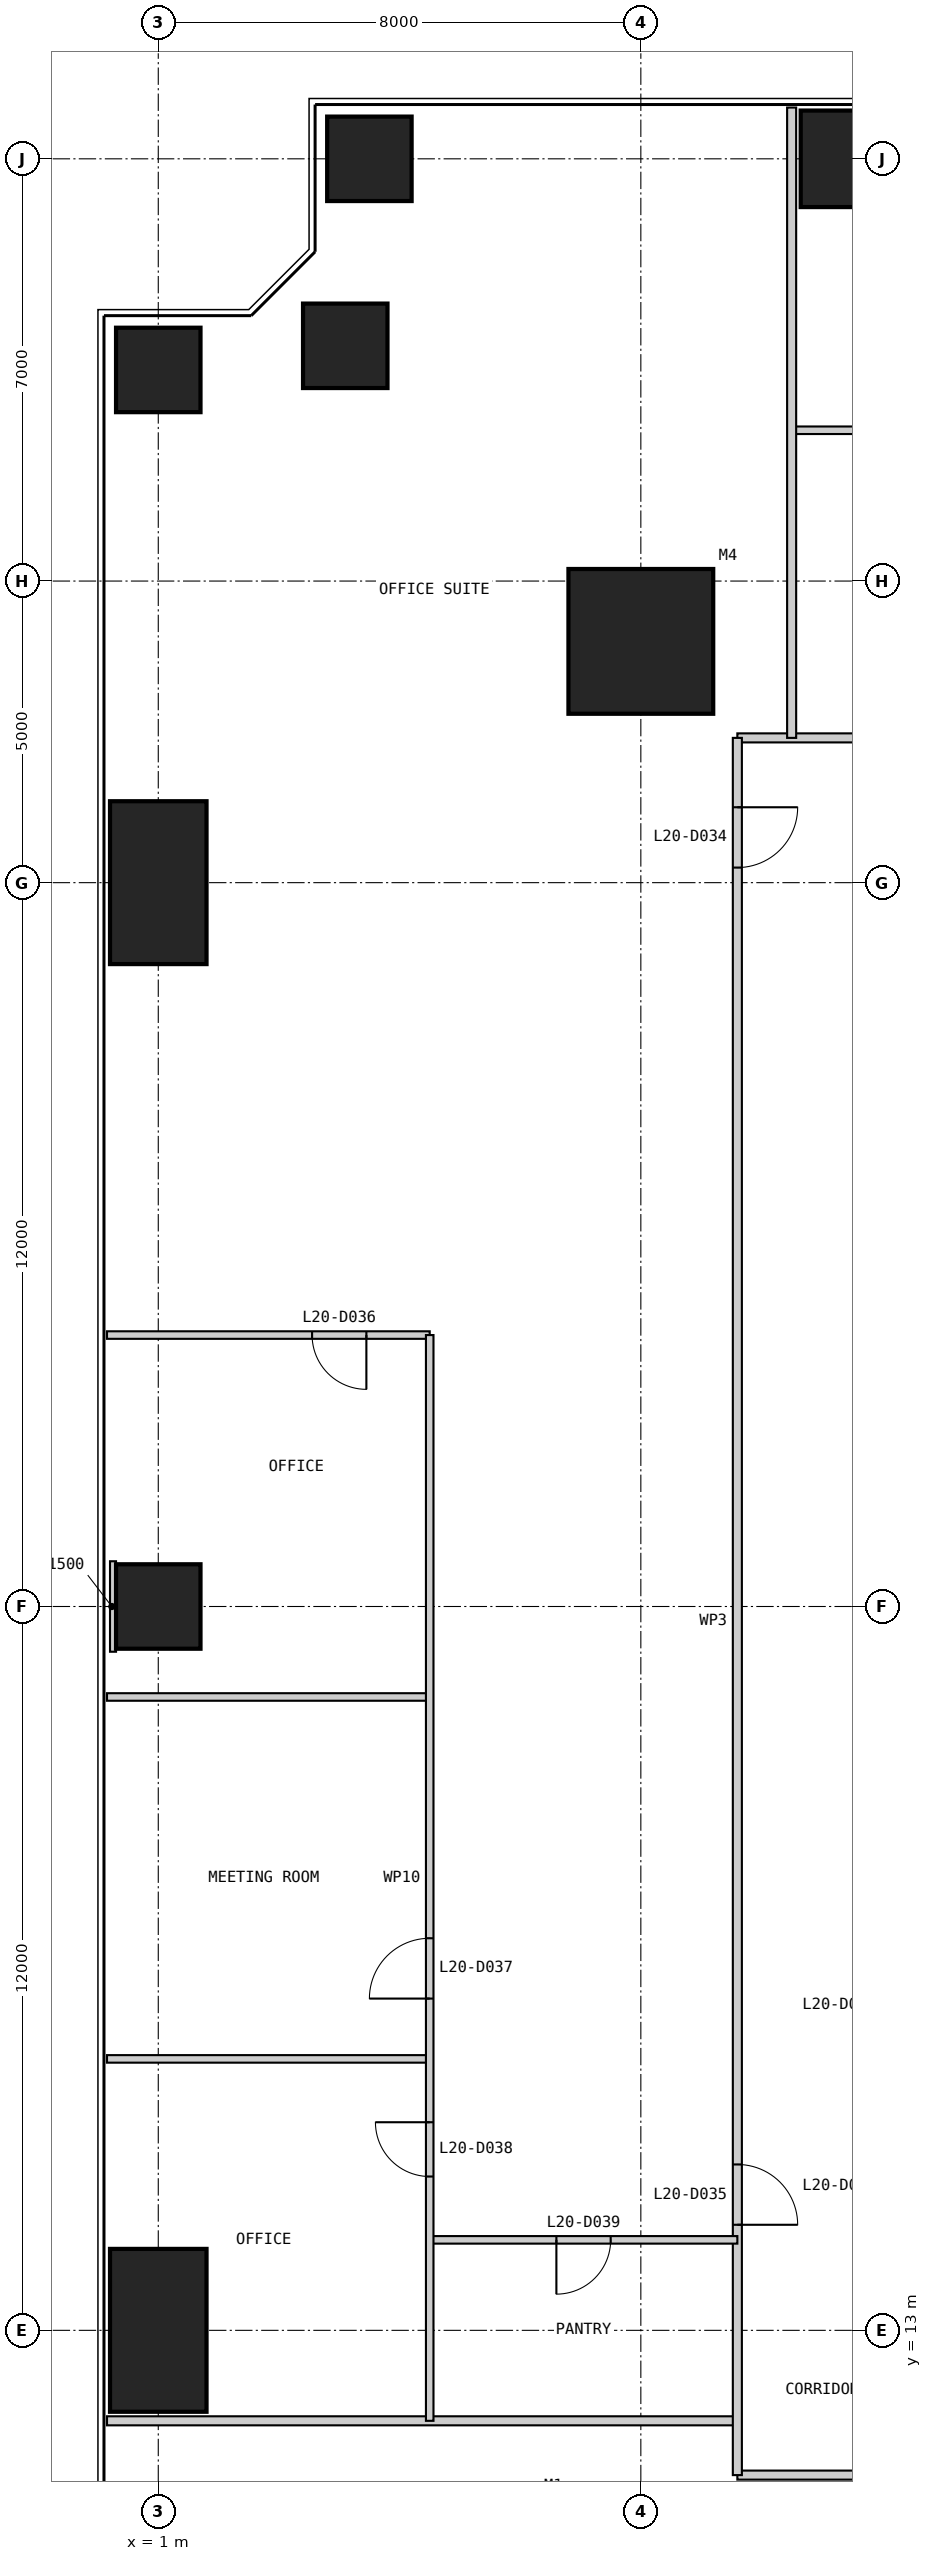
"""IFC4 building model, lengths in metres.
Left out: names, types, materials, properties, quantities, classifications, styles, units other than length and angle.
Written with IfcOpenShell. Run it as: python <this file> out.ifc"""

import sys

from ifc_helpers import new_model, si_unit, direction, frame, frame_2d, origin, origin_2d, place, context, subcontext, project, spatial, rectangle, extrude, element, fill, save


model = new_model("IFC4")
c1 = context("Model", 3, precision=1e-05, world=origin(), true_north=direction((0.0, 1.0)))
c2 = subcontext(c1, "Body", "Model", "MODEL_VIEW")
j1 = project(units=[si_unit("LENGTHUNIT", "METRE"), si_unit("PLANEANGLEUNIT", "RADIAN")], contexts=[c1])
p1 = place(None, origin())
s1 = spatial("IfcSite", under=j1, at=p1, CompositionType="ELEMENT")
p2 = place(p1, origin())
s2 = spatial("IfcBuilding", under=s1, at=p2, CompositionType="ELEMENT")
p3 = place(p2, frame((0.0, 0.0, 87.0)))
s3 = spatial("IfcBuildingStorey", under=s2, at=p3, CompositionType="ELEMENT", Elevation=87.0)
p4 = place(p3, frame((9.0, 41.0, 0.0), z_axis=(0.0, 0.0, 1.0), x_axis=(1.0, 0.0, 0.0)))
e1 = element("IfcColumn", 1, at=p4, inside=s3, PredefinedType="COLUMN", context=c2, shape_type="SweptSolid", body=[
    extrude(rectangle(XDim=2.4, YDim=2.4, at=origin_2d()), origin(), (0.0, 0.0, 1.0), 4.0),
])
p5 = place(p3, frame((13.0, 49.0, 0.0), z_axis=(0.0, 0.0, 1.0), x_axis=(1.0, 0.0, 0.0)))
e2 = element("IfcColumn", 2, at=p5, inside=s3, PredefinedType="COLUMN", context=c2, shape_type="SweptSolid", body=[
    extrude(rectangle(XDim=2.7, YDim=1.6, at=origin_2d()), origin(), (0.0, 0.0, 1.0), 4.0),
])
for number, where, z_axis, x_axis in (
    (3, (4.5, 49.0, 0.0), (0.0, 0.0, 1.0), (1.0, 0.0, 0.0)),
    (4, (4.1, 45.9, 0.0), (0.0, 0.0, 1.0), (1.0, 0.0, 0.0)),
    (5, (1.0, 45.5, 0.0), (0.0, 0.0, 1.0), (1.0, 0.0, 0.0)),
):
    element("IfcColumn", number, at=place(p3, frame(where, z_axis=z_axis, x_axis=x_axis)), inside=s3, PredefinedType="COLUMN", context=c2, shape_type="SweptSolid", body=[
        extrude(rectangle(XDim=1.4, YDim=1.4, at=origin_2d()), origin(), (0.0, 0.0, 1.0), 4.0),
    ])
p6 = place(p3, frame((1.0, 37.0, 0.0), z_axis=(0.0, 0.0, 1.0), x_axis=(1.0, 0.0, 0.0)))
e6 = element("IfcColumn", 6, at=p6, inside=s3, PredefinedType="COLUMN", context=c2, shape_type="SweptSolid", body=[
    extrude(rectangle(XDim=1.6, YDim=2.7, at=origin_2d()), origin(), (0.0, 0.0, 1.0), 4.0),
])
p7 = place(p3, frame((1.0, 25.0, 0.0), z_axis=(0.0, 0.0, 1.0), x_axis=(1.0, 0.0, 0.0)))
e7 = element("IfcColumn", 7, at=p7, inside=s3, PredefinedType="COLUMN", context=c2, shape_type="SweptSolid", body=[
    extrude(rectangle(XDim=1.4, YDim=1.4, at=origin_2d()), origin(), (0.0, 0.0, 1.0), 4.0),
])
p8 = place(p3, frame((1.0, 13.0, 0.0), z_axis=(0.0, 0.0, 1.0), x_axis=(1.0, 0.0, 0.0)))
e8 = element("IfcColumn", 8, at=p8, inside=s3, PredefinedType="COLUMN", context=c2, shape_type="SweptSolid", body=[
    extrude(rectangle(XDim=1.6, YDim=2.7, at=origin_2d()), origin(), (0.0, 0.0, 1.0), 4.0),
])
p9 = place(p3, frame((10.6, 10.6, 0.0), z_axis=(0.0, 0.0, 1.0), x_axis=(1.0, 0.0, 0.0)))
e9 = element("IfcWall", 9, at=p9, inside=s3, PredefinedType="PARTITIONING", context=c2, shape_type="SweptSolid", body=[
    extrude(rectangle(XDim=27.9, YDim=0.15, at=frame_2d((13.95, 0.0))), origin(), (0.0, 0.0, 1.0), 3.8),
])
p10 = place(p9, frame((3.4, 0.0, 0.0)))
e10 = element("IfcOpeningElement", 10, at=p10, cuts=e9, PredefinedType="OPENING", context=c2, shape_type="SweptSolid", body=[
    extrude(rectangle(XDim=1.0, YDim=2.2, at=frame_2d((0.5, 1.1))), frame((0.0, 0.085, 0.0), z_axis=(0.0, -1.0, 0.0), x_axis=(1.0, 0.0, 0.0)), (0.0, 0.0, 1.0), 0.17),
])
p11 = place(p9, frame((10.15, 0.0, 0.0)))
e11 = element("IfcOpeningElement", 11, at=p11, cuts=e9, PredefinedType="OPENING", context=c2, shape_type="SweptSolid", body=[
    extrude(rectangle(XDim=1.0, YDim=2.2, at=frame_2d((0.5, 1.1))), frame((0.0, 0.085, 0.0), z_axis=(0.0, -1.0, 0.0), x_axis=(1.0, 0.0, 0.0)), (0.0, 0.0, 1.0), 0.17),
])
p12 = place(p9, frame((17.65, 0.0, 0.0)))
e12 = element("IfcOpeningElement", 12, at=p12, cuts=e9, PredefinedType="OPENING", context=c2, shape_type="SweptSolid", body=[
    extrude(rectangle(XDim=1.0, YDim=2.2, at=frame_2d((0.5, 1.1))), frame((0.0, 0.085, 0.0), z_axis=(0.0, -1.0, 0.0), x_axis=(1.0, 0.0, 0.0)), (0.0, 0.0, 1.0), 0.17),
])
p13 = place(p9, frame((24.4, 0.0, 0.0)))
e13 = element("IfcOpeningElement", 13, at=p13, cuts=e9, PredefinedType="OPENING", context=c2, shape_type="SweptSolid", body=[
    extrude(rectangle(XDim=1.0, YDim=2.2, at=frame_2d((0.5, 1.1))), frame((0.0, 0.085, 0.0), z_axis=(0.0, -1.0, 0.0), x_axis=(1.0, 0.0, 0.0)), (0.0, 0.0, 1.0), 0.17),
])
p14 = place(p3, frame((0.15, 11.5, 0.0), z_axis=(0.0, 0.0, 1.0), x_axis=(1.0, 0.0, 0.0)))
e14 = element("IfcWall", 14, at=p14, inside=s3, PredefinedType="PARTITIONING", context=c2, shape_type="SweptSolid", body=[
    extrude(rectangle(XDim=10.45, YDim=0.15, at=frame_2d((5.225, 0.0))), origin(), (0.0, 0.0, 1.0), 3.8),
])
p15 = place(p3, frame((38.5, 39.4, 0.0), z_axis=(0.0, 0.0, 1.0), x_axis=(-1.0, 0.0, 0.0)))
e15 = element("IfcWall", 15, at=p15, inside=s3, PredefinedType="PARTITIONING", context=c2, shape_type="SweptSolid", body=[
    extrude(rectangle(XDim=27.9, YDim=0.15, at=frame_2d((13.95, 0.0))), origin(), (0.0, 0.0, 1.0), 3.8),
])
p16 = place(p15, frame((0.25, 0.0, 0.0)))
e16 = element("IfcOpeningElement", 16, at=p16, cuts=e15, PredefinedType="OPENING", context=c2, shape_type="SweptSolid", body=[
    extrude(rectangle(XDim=1.0, YDim=2.2, at=frame_2d((0.5, 1.1))), frame((0.0, 0.085, 0.0), z_axis=(0.0, -1.0, 0.0), x_axis=(1.0, 0.0, 0.0)), (0.0, 0.0, 1.0), 0.17),
])
p17 = place(p15, frame((22.75, 0.0, 0.0)))
e17 = element("IfcOpeningElement", 17, at=p17, cuts=e15, PredefinedType="OPENING", context=c2, shape_type="SweptSolid", body=[
    extrude(rectangle(XDim=1.0, YDim=2.2, at=frame_2d((0.5, 1.1))), frame((0.0, 0.085, 0.0), z_axis=(0.0, -1.0, 0.0), x_axis=(1.0, 0.0, 0.0)), (0.0, 0.0, 1.0), 0.17),
])
p18 = place(p3, frame((29.5, 44.5, 0.0), z_axis=(0.0, 0.0, 1.0), x_axis=(-1.0, 0.0, 0.0)))
e18 = element("IfcWall", 18, at=p18, inside=s3, PredefinedType="PARTITIONING", context=c2, shape_type="SweptSolid", body=[
    extrude(rectangle(XDim=18.0, YDim=0.125, at=frame_2d((9.0, 0.0))), origin(), (0.0, 0.0, 1.0), 3.8),
])
p19 = place(p18, frame((10.0, 0.0, 0.0)))
e19 = element("IfcOpeningElement", 19, at=p19, cuts=e18, PredefinedType="OPENING", context=c2, shape_type="SweptSolid", body=[
    extrude(rectangle(XDim=1.0, YDim=2.2, at=frame_2d((0.5, 1.1))), frame((0.0, 0.073, 0.0), z_axis=(0.0, -1.0, 0.0), x_axis=(1.0, 0.0, 0.0)), (0.0, 0.0, 1.0), 0.145),
])
p20 = place(p18, frame((13.05, 0.0, 0.0)))
e20 = element("IfcOpeningElement", 20, at=p20, cuts=e18, PredefinedType="OPENING", context=c2, shape_type="SweptSolid", body=[
    extrude(rectangle(XDim=0.9, YDim=2.2, at=frame_2d((0.45, 1.1))), frame((0.0, 0.073, 0.0), z_axis=(0.0, -1.0, 0.0), x_axis=(1.0, 0.0, 0.0)), (0.0, 0.0, 1.0), 0.145),
])
p21 = place(p3, frame((10.6, 39.4, 0.0), z_axis=(0.0, 0.0, 1.0), x_axis=(0.0, -1.0, 0.0)))
e21 = element("IfcWall", 21, at=p21, inside=s3, PredefinedType="PARTITIONING", context=c2, shape_type="SweptSolid", body=[
    extrude(rectangle(XDim=28.8, YDim=0.15, at=frame_2d((14.4, 0.0))), origin(), (0.0, 0.0, 1.0), 3.8),
])
p22 = place(p21, frame((1.15, 0.0, 0.0)))
e22 = element("IfcOpeningElement", 22, at=p22, cuts=e21, PredefinedType="OPENING", context=c2, shape_type="SweptSolid", body=[
    extrude(rectangle(XDim=1.0, YDim=2.2, at=frame_2d((0.5, 1.1))), frame((0.0, 0.085, 0.0), z_axis=(0.0, -1.0, 0.0), x_axis=(1.0, 0.0, 0.0)), (0.0, 0.0, 1.0), 0.17),
])
p23 = place(p21, frame((23.65, 0.0, 0.0)))
e23 = element("IfcOpeningElement", 23, at=p23, cuts=e21, PredefinedType="OPENING", context=c2, shape_type="SweptSolid", body=[
    extrude(rectangle(XDim=1.0, YDim=2.2, at=frame_2d((0.5, 1.1))), frame((0.0, 0.085, 0.0), z_axis=(0.0, -1.0, 0.0), x_axis=(1.0, 0.0, 0.0)), (0.0, 0.0, 1.0), 0.17),
])
p24 = place(p3, frame((11.5, 49.85, 0.0), z_axis=(0.0, 0.0, 1.0), x_axis=(0.0, -1.0, 0.0)))
e24 = element("IfcWall", 24, at=p24, inside=s3, PredefinedType="PARTITIONING", context=c2, shape_type="SweptSolid", body=[
    extrude(rectangle(XDim=10.45, YDim=0.15, at=frame_2d((5.225, 0.0))), origin(), (0.0, 0.0, 1.0), 3.8),
])
p25 = place(p3, frame((0.15, 29.5, 0.0), z_axis=(0.0, 0.0, 1.0), x_axis=(1.0, 0.0, 0.0)))
e25 = element("IfcWall", 25, at=p25, inside=s3, PredefinedType="PARTITIONING", context=c2, shape_type="SweptSolid", body=[
    extrude(rectangle(XDim=5.35, YDim=0.125, at=frame_2d((2.675, 0.0))), origin(), (0.0, 0.0, 1.0), 3.8),
])
p26 = place(p25, frame((3.4, 0.0, 0.0)))
e26 = element("IfcOpeningElement", 26, at=p26, cuts=e25, PredefinedType="OPENING", context=c2, shape_type="SweptSolid", body=[
    extrude(rectangle(XDim=0.9, YDim=2.2, at=frame_2d((0.45, 1.1))), frame((0.0, 0.073, 0.0), z_axis=(0.0, -1.0, 0.0), x_axis=(1.0, 0.0, 0.0)), (0.0, 0.0, 1.0), 0.145),
])
for number, where, z_axis, x_axis in (
    (27, (0.15, 23.5, 0.0), (0.0, 0.0, 1.0), (1.0, 0.0, 0.0)),
    (28, (0.15, 17.5, 0.0), (0.0, 0.0, 1.0), (1.0, 0.0, 0.0)),
):
    element("IfcWall", number, at=place(p3, frame(where, z_axis=z_axis, x_axis=x_axis)), inside=s3, PredefinedType="PARTITIONING", context=c2, shape_type="SweptSolid", body=[
        extrude(rectangle(XDim=5.35, YDim=0.125, at=frame_2d((2.675, 0.0))), origin(), (0.0, 0.0, 1.0), 3.8),
    ])
p27 = place(p3, frame((5.5, 14.5, 0.0), z_axis=(0.0, 0.0, 1.0), x_axis=(1.0, 0.0, 0.0)))
e29 = element("IfcWall", 29, at=p27, inside=s3, PredefinedType="PARTITIONING", context=c2, shape_type="SweptSolid", body=[
    extrude(rectangle(XDim=5.1, YDim=0.125, at=frame_2d((2.55, 0.0))), origin(), (0.0, 0.0, 1.0), 3.8),
])
p28 = place(p27, frame((2.1, 0.0, 0.0)))
e30 = element("IfcOpeningElement", 30, at=p28, cuts=e29, PredefinedType="OPENING", context=c2, shape_type="SweptSolid", body=[
    extrude(rectangle(XDim=0.9, YDim=2.2, at=frame_2d((0.45, 1.1))), frame((0.0, 0.073, 0.0), z_axis=(0.0, -1.0, 0.0), x_axis=(1.0, 0.0, 0.0)), (0.0, 0.0, 1.0), 0.145),
])
p29 = place(p3, frame((5.5, 29.5, 0.0), z_axis=(0.0, 0.0, 1.0), x_axis=(0.0, -1.0, 0.0)))
e31 = element("IfcWall", 31, at=p29, inside=s3, PredefinedType="PARTITIONING", context=c2, shape_type="SweptSolid", body=[
    extrude(rectangle(XDim=18.0, YDim=0.125, at=frame_2d((9.0, 0.0))), origin(), (0.0, 0.0, 1.0), 3.8),
])
p30 = place(p29, frame((10.0, 0.0, 0.0)))
e32 = element("IfcOpeningElement", 32, at=p30, cuts=e31, PredefinedType="OPENING", context=c2, shape_type="SweptSolid", body=[
    extrude(rectangle(XDim=1.0, YDim=2.2, at=frame_2d((0.5, 1.1))), frame((0.0, 0.073, 0.0), z_axis=(0.0, -1.0, 0.0), x_axis=(1.0, 0.0, 0.0)), (0.0, 0.0, 1.0), 0.145),
])
p31 = place(p29, frame((13.05, 0.0, 0.0)))
e33 = element("IfcOpeningElement", 33, at=p31, cuts=e31, PredefinedType="OPENING", context=c2, shape_type="SweptSolid", body=[
    extrude(rectangle(XDim=0.9, YDim=2.2, at=frame_2d((0.45, 1.1))), frame((0.0, 0.073, 0.0), z_axis=(0.0, -1.0, 0.0), x_axis=(1.0, 0.0, 0.0)), (0.0, 0.0, 1.0), 0.145),
])
p32 = place(p3, frame((0.2, 25.0, 0.0), z_axis=(0.0, 0.0, 1.0), x_axis=(1.0, 0.0, 0.0)))
e34 = element("IfcWall", 34, at=p32, inside=s3, PredefinedType="PARTITIONING", context=c2, shape_type="SweptSolid", body=[
    extrude(rectangle(XDim=0.1, YDim=1.5, at=frame_2d((0.05, 0.0))), origin(), (0.0, 0.0, 1.0), 3.8),
])
p33 = place(p22, origin())
e35 = element("IfcDoor", 35, at=p33, inside=s3, OperationType="SINGLE_SWING_LEFT", PredefinedType="DOOR", context=c2, shape_type="SweptSolid", body=[
    extrude(rectangle(XDim=1.0, YDim=2.2, at=frame_2d((0.5, 1.1))), frame((0.0, 0.025, 0.0), z_axis=(0.0, -1.0, 0.0), x_axis=(1.0, 0.0, 0.0)), (0.0, 0.0, 1.0), 0.05),
])
fill(e22, e35)
p34 = place(p23, origin())
e36 = element("IfcDoor", 36, at=p34, inside=s3, OperationType="SINGLE_SWING_RIGHT", PredefinedType="DOOR", context=c2, shape_type="SweptSolid", body=[
    extrude(rectangle(XDim=1.0, YDim=2.2, at=frame_2d((0.5, 1.1))), frame((0.0, 0.025, 0.0), z_axis=(0.0, -1.0, 0.0), x_axis=(1.0, 0.0, 0.0)), (0.0, 0.0, 1.0), 0.05),
])
fill(e23, e36)
p35 = place(p26, frame((0.9, 0.0, 0.0), z_axis=(0.0, 0.0, 1.0), x_axis=(-1.0, 0.0, 0.0)))
e37 = element("IfcDoor", 37, at=p35, inside=s3, OperationType="SINGLE_SWING_LEFT", PredefinedType="DOOR", context=c2, shape_type="SweptSolid", body=[
    extrude(rectangle(XDim=0.9, YDim=2.2, at=frame_2d((0.45, 1.1))), frame((0.0, 0.025, 0.0), z_axis=(0.0, -1.0, 0.0), x_axis=(1.0, 0.0, 0.0)), (0.0, 0.0, 1.0), 0.05),
])
fill(e26, e37)
p36 = place(p30, frame((1.0, 0.0, 0.0), z_axis=(0.0, 0.0, 1.0), x_axis=(-1.0, 0.0, 0.0)))
e38 = element("IfcDoor", 38, at=p36, inside=s3, OperationType="SINGLE_SWING_LEFT", PredefinedType="DOOR", context=c2, shape_type="SweptSolid", body=[
    extrude(rectangle(XDim=1.0, YDim=2.2, at=frame_2d((0.5, 1.1))), frame((0.0, 0.025, 0.0), z_axis=(0.0, -1.0, 0.0), x_axis=(1.0, 0.0, 0.0)), (0.0, 0.0, 1.0), 0.05),
])
fill(e32, e38)
p37 = place(p31, frame((0.9, 0.0, 0.0), z_axis=(0.0, 0.0, 1.0), x_axis=(-1.0, 0.0, 0.0)))
e39 = element("IfcDoor", 39, at=p37, inside=s3, OperationType="SINGLE_SWING_RIGHT", PredefinedType="DOOR", context=c2, shape_type="SweptSolid", body=[
    extrude(rectangle(XDim=0.9, YDim=2.2, at=frame_2d((0.45, 1.1))), frame((0.0, 0.025, 0.0), z_axis=(0.0, -1.0, 0.0), x_axis=(1.0, 0.0, 0.0)), (0.0, 0.0, 1.0), 0.05),
])
fill(e33, e39)
p38 = place(p28, frame((0.9, 0.0, 0.0), z_axis=(0.0, 0.0, 1.0), x_axis=(-1.0, 0.0, 0.0)))
e40 = element("IfcDoor", 40, at=p38, inside=s3, OperationType="SINGLE_SWING_RIGHT", PredefinedType="DOOR", context=c2, shape_type="SweptSolid", body=[
    extrude(rectangle(XDim=0.9, YDim=2.2, at=frame_2d((0.45, 1.1))), frame((0.0, 0.025, 0.0), z_axis=(0.0, -1.0, 0.0), x_axis=(1.0, 0.0, 0.0)), (0.0, 0.0, 1.0), 0.05),
])
fill(e30, e40)
save(model, sys.argv[1])
